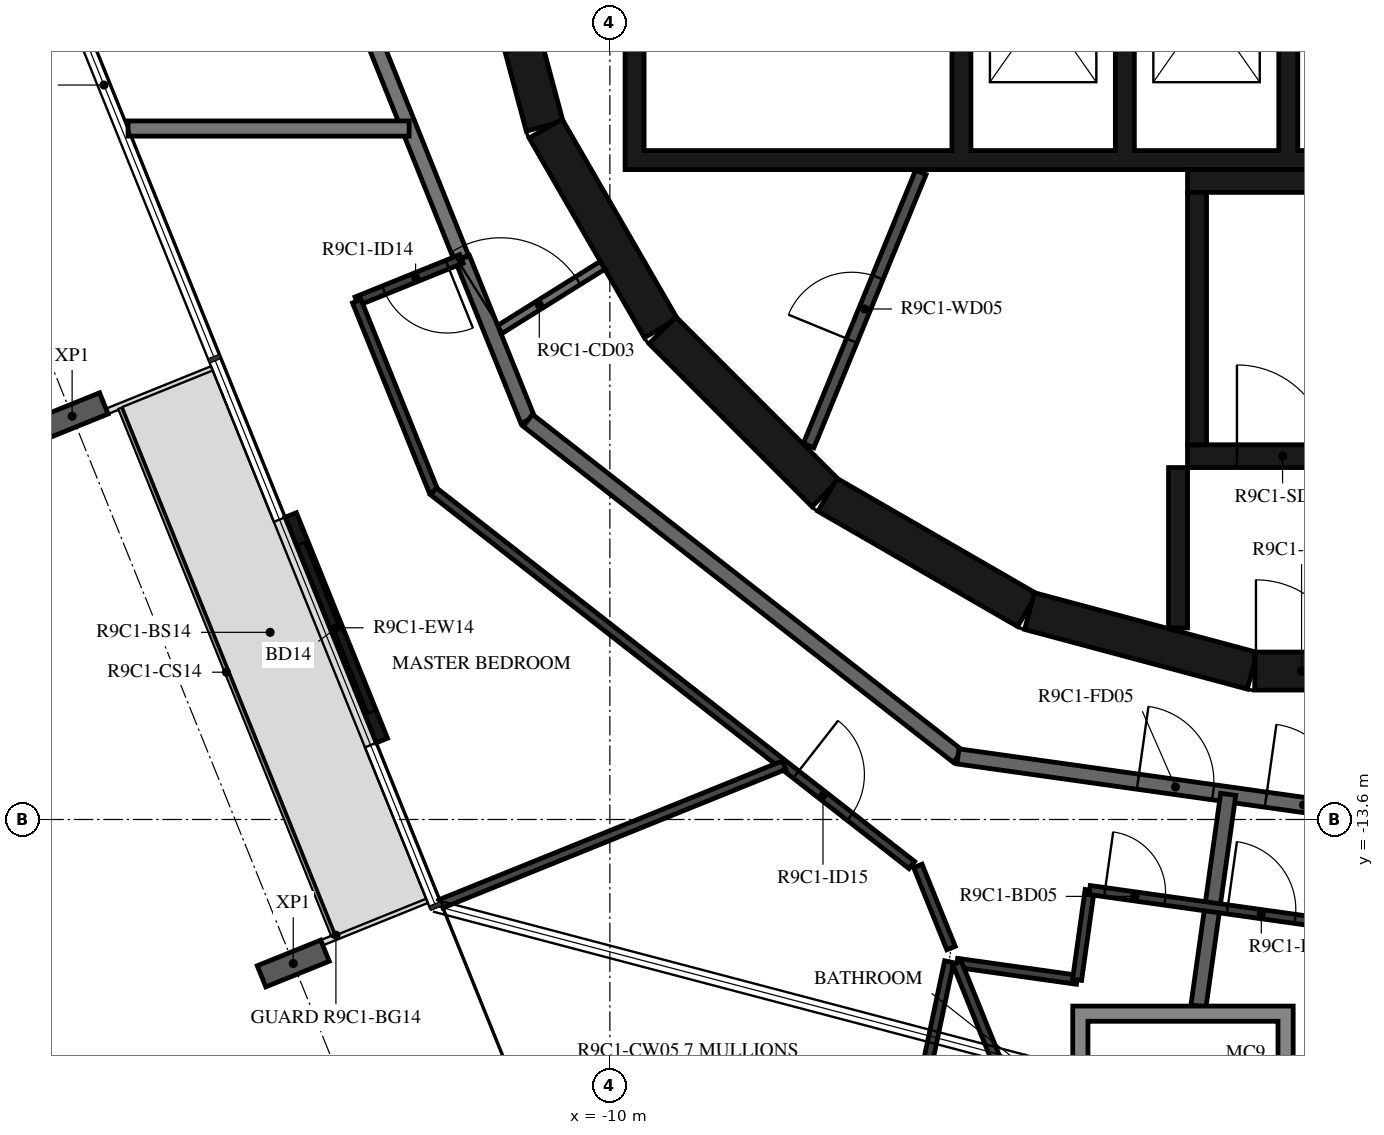
"""IFC4 building model, lengths in metres.
Left out: names, types, materials, properties, quantities, classifications, styles, units other than length and angle.
Written with IfcOpenShell. Run it as: python <this file> out.ifc"""

import sys

from ifc_helpers import new_model, si_unit, direction, frame, frame_2d, origin, origin_2d, place, context, subcontext, project, spatial, polyline, rectangle, i_section, outline, extrude, element, fill, save


model = new_model("IFC4")
c1 = context("Model", 3, precision=1e-05, world=origin(), true_north=direction((0.0, 1.0)))
c2 = subcontext(c1, "Body", "Model", "MODEL_VIEW")
j1 = project(units=[si_unit("LENGTHUNIT", "METRE"), si_unit("PLANEANGLEUNIT", "RADIAN")], contexts=[c1])
p1 = place(None, origin())
s1 = spatial("IfcSite", under=j1, at=p1, CompositionType="ELEMENT")
p2 = place(p1, origin())
s2 = spatial("IfcBuilding", under=s1, at=p2, CompositionType="ELEMENT")
p3 = place(p2, frame((0.0, 0.0, 357.5)))
s3 = spatial("IfcBuildingStorey", under=s2, at=p3, CompositionType="ELEMENT", Elevation=357.5)
for number, where, z_axis, x_axis in (
    (1, (-17.075, -8.294, -0.38), (0.0, 0.0, 1.0), (-0.375, 0.927, 0.0)),
    (2, (-14.166, -15.495, -0.38), (0.0, 0.0, 1.0), (-0.375, 0.927, 0.0)),
):
    element("IfcColumn", number, at=place(p3, frame(where, z_axis=z_axis, x_axis=x_axis)), inside=s3, PredefinedType="COLUMN", context=c2, shape_type="SweptSolid", body=[
        extrude(i_section(OverallWidth=0.3, OverallDepth=0.9, WebThickness=0.019, FlangeThickness=0.035, FilletRadius=0.03, at=origin_2d()), origin(), (0.0, 0.0, 1.0), 3.5),
    ])
p4 = place(p3, frame((-14.198, -9.594, 0.0), z_axis=(0.0, 0.0, 1.0), x_axis=(0.374624519695, -0.927176611678, 0.0)))
e3 = element("IfcWall", 3, at=p4, inside=s3, PredefinedType="STANDARD", context=c2, shape_type="SweptSolid", body=[
    extrude(rectangle(XDim=3.2, YDim=0.16, at=frame_2d((1.6, 0.0))), origin(), (0.0, 0.0, 1.0), 3.12),
])
p5 = place(p4, frame((0.4, 0.0, 0.0)))
e4 = element("IfcOpeningElement", 4, at=p5, cuts=e3, PredefinedType="OPENING", context=c2, shape_type="SweptSolid", body=[
    extrude(rectangle(XDim=2.4, YDim=2.4, at=frame_2d((1.2, 1.2))), frame((0.0, 0.09, 0.0), z_axis=(0.0, -1.0, 0.0), x_axis=(1.0, 0.0, 0.0)), (0.0, 0.0, 1.0), 0.18),
])
p6 = place(p3, frame((-11.643, -1.55, 0.0), z_axis=(0.0, 0.0, 1.0), x_axis=(0.258734743916, -0.965948410781, 0.0)))
e5 = element("IfcWall", 5, at=p6, inside=s3, PredefinedType="SHEAR", context=c2, shape_type="SweptSolid", body=[
    extrude(rectangle(XDim=3.033, YDim=0.5, at=frame_2d((1.516, 0.0))), origin(), (0.0, 0.0, 1.0), 3.12),
])
p7 = place(p6, frame((1.066, 0.0, 0.0)))
e6 = element("IfcOpeningElement", 6, at=p7, cuts=e5, PredefinedType="OPENING", context=c2, shape_type="SweptSolid", body=[
    extrude(rectangle(XDim=0.9, YDim=2.1, at=frame_2d((0.45, 1.05))), frame((0.0, 0.26, 0.0), z_axis=(0.0, -1.0, 0.0), x_axis=(1.0, 0.0, 0.0)), (0.0, 0.0, 1.0), 0.52),
])
p8 = place(p3, frame((-10.845, -4.51, 0.0), z_axis=(0.0, 0.0, 1.0), x_axis=(0.500087131594, -0.865975092491, 0.0)))
e7 = element("IfcWall", 7, at=p8, inside=s3, PredefinedType="SHEAR", context=c2, shape_type="SweptSolid", body=[
    extrude(rectangle(XDim=3.033, YDim=0.5, at=frame_2d((1.516, 0.0))), origin(), (0.0, 0.0, 1.0), 3.12),
])
p9 = place(p3, frame((-9.308, -7.164, 0.0), z_axis=(0.0, 0.0, 1.0), x_axis=(0.707106781187, -0.707106781187, 0.0)))
e8 = element("IfcWall", 8, at=p9, inside=s3, PredefinedType="SHEAR", context=c2, shape_type="SweptSolid", body=[
    extrude(rectangle(XDim=3.032, YDim=0.5, at=frame_2d((1.516, 0.0))), origin(), (0.0, 0.0, 1.0), 3.12),
])
for number, where, z_axis, x_axis in (
    (9, (-7.137, -9.329, 0.0), (0.0, 0.0, 1.0), (0.866, -0.5, 0.0)),
    (10, (-4.479, -10.858, 0.0), (0.0, 0.0, 1.0), (0.966, -0.259, 0.0)),
):
    element("IfcWall", number, at=place(p3, frame(where, z_axis=z_axis, x_axis=x_axis)), inside=s3, PredefinedType="SHEAR", context=c2, shape_type="SweptSolid", body=[
        extrude(rectangle(XDim=3.033, YDim=0.5, at=frame_2d((1.516, 0.0))), origin(), (0.0, 0.0, 1.0), 3.12),
    ])
p10 = place(p3, frame((-1.516, -11.647, 0.0), z_axis=(0.0, 0.0, 1.0), x_axis=(1.0, 0.0, 0.0)))
e11 = element("IfcWall", 11, at=p10, inside=s3, PredefinedType="SHEAR", context=c2, shape_type="SweptSolid", body=[
    extrude(rectangle(XDim=3.033, YDim=0.5, at=frame_2d((1.516, 0.0))), origin(), (0.0, 0.0, 1.0), 3.12),
])
p11 = place(p10, frame((0.016, 0.0, 0.0)))
e12 = element("IfcOpeningElement", 12, at=p11, cuts=e11, PredefinedType="OPENING", context=c2, shape_type="SweptSolid", body=[
    extrude(rectangle(XDim=1.2, YDim=2.1, at=frame_2d((0.6, 1.05))), frame((0.0, 0.26, 0.0), z_axis=(0.0, -1.0, 0.0), x_axis=(1.0, 0.0, 0.0)), (0.0, 0.0, 1.0), 0.52),
])
p12 = place(p3, frame((-2.275, -8.67, 0.0), z_axis=(0.0, 0.0, 1.0), x_axis=(0.0, 1.0, 0.0)))
e13 = element("IfcWall", 13, at=p12, inside=s3, PredefinedType="SHEAR", context=c2, shape_type="SweptSolid", body=[
    extrude(rectangle(XDim=3.32, YDim=0.25, at=frame_2d((1.66, 0.0))), origin(), (0.0, 0.0, 1.0), 3.12),
])
p13 = place(p3, frame((-2.4, -5.2, 0.0), z_axis=(0.0, 0.0, 1.0), x_axis=(1.0, 0.0, 0.0)))
e14 = element("IfcWall", 14, at=p13, inside=s3, PredefinedType="SHEAR", context=c2, shape_type="SweptSolid", body=[
    extrude(rectangle(XDim=7.05, YDim=0.3, at=frame_2d((3.525, 0.0))), origin(), (0.0, 0.0, 1.0), 3.12),
])
p14 = place(p3, frame((-2.4, -8.82, 0.0), z_axis=(0.0, 0.0, 1.0), x_axis=(1.0, 0.0, 0.0)))
e15 = element("IfcWall", 15, at=p14, inside=s3, PredefinedType="SHEAR", context=c2, shape_type="SweptSolid", body=[
    extrude(rectangle(XDim=2.5, YDim=0.3, at=frame_2d((1.25, 0.0))), origin(), (0.0, 0.0, 1.0), 3.12),
])
p15 = place(p14, frame((0.65, 0.0, 0.0)))
e16 = element("IfcOpeningElement", 16, at=p15, cuts=e15, PredefinedType="OPENING", context=c2, shape_type="SweptSolid", body=[
    extrude(rectangle(XDim=1.2, YDim=2.1, at=frame_2d((0.6, 1.05))), frame((0.0, 0.16, 0.0), z_axis=(0.0, -1.0, 0.0), x_axis=(1.0, 0.0, 0.0)), (0.0, 0.0, 1.0), 0.32),
])
p16 = place(p3, frame((-2.525, -8.97, 0.0), z_axis=(0.0, 0.0, 1.0), x_axis=(0.0, -1.0, 0.0)))
e17 = element("IfcWall", 17, at=p16, inside=s3, PredefinedType="SHEAR", context=c2, shape_type="SweptSolid", body=[
    extrude(rectangle(XDim=2.11, YDim=0.25, at=frame_2d((1.055, 0.0))), origin(), (0.0, 0.0, 1.0), 3.12),
])
p17 = place(p3, origin())
e18 = element("IfcWall", 18, at=p17, inside=s3, PredefinedType="SHEAR", context=c2, shape_type="SweptSolid", body=[
    extrude(outline(polyline([(9.8, -5.05), (9.8, -4.8), (9.8, -1.9), (9.55, -1.9), (9.55, -4.8), (7.65, -4.8), (7.65, -1.9), (7.4, -1.9), (7.4, -4.8), (5.5, -4.8), (5.5, -1.9), (5.25, -1.9), (5.25, -4.8), (3.35, -4.8), (3.35, -1.9), (3.1, -1.9), (3.1, -4.8), (1.2, -4.8), (1.2, -1.9), (0.95, -1.9), (0.95, -4.8), (-0.95, -4.8), (-0.95, -1.9), (-1.2, -1.9), (-1.2, -4.8), (-3.1, -4.8), (-3.1, -1.9), (-3.35, -1.9), (-3.35, -4.8), (-5.25, -4.8), (-5.25, -1.9), (-5.5, -1.9), (-5.5, -4.8), (-9.55, -4.8), (-9.55, -1.9), (-9.8, -1.9), (-9.8, -4.8), (-9.8, -5.05), (9.8, -5.05)])), origin(), (0.0, 0.0, 1.0), 3.12),
])
p18 = place(p3, frame((-7.385, -8.681, 0.0), z_axis=(0.0, 0.0, 1.0), x_axis=(0.379804590409, 0.925066739811, 0.0)))
e19 = element("IfcWall", 19, at=p18, inside=s3, PredefinedType="PARTITIONING", context=c2, shape_type="SweptSolid", body=[
    extrude(rectangle(XDim=3.885, YDim=0.15, at=frame_2d((1.942, 0.0))), origin(), (0.0, 0.0, 1.0), 3.12),
])
p19 = place(p18, frame((1.493, 0.0, 0.0)))
e20 = element("IfcOpeningElement", 20, at=p19, cuts=e19, PredefinedType="OPENING", context=c2, shape_type="SweptSolid", body=[
    extrude(rectangle(XDim=0.9, YDim=2.1, at=frame_2d((0.45, 1.05))), frame((0.0, 0.085, 0.0), z_axis=(0.0, -1.0, 0.0), x_axis=(1.0, 0.0, 0.0)), (0.0, 0.0, 1.0), 0.17),
])
p20 = place(p3, frame((-11.539, -7.21, 0.0), z_axis=(0.0, 0.0, 1.0), x_axis=(0.848103039868, 0.529831325769, 0.0)))
e21 = element("IfcWall", 21, at=p20, inside=s3, PredefinedType="PARTITIONING", context=c2, shape_type="SweptSolid", body=[
    extrude(rectangle(XDim=1.702, YDim=0.12, at=frame_2d((0.851, 0.0))), origin(), (0.0, 0.0, 1.0), 3.12),
])
p21 = place(p20, frame((0.12, 0.0, 0.0)))
e22 = element("IfcOpeningElement", 22, at=p21, cuts=e21, PredefinedType="OPENING", context=c2, shape_type="SweptSolid", body=[
    extrude(rectangle(XDim=1.2, YDim=2.1, at=frame_2d((0.6, 1.05))), frame((0.0, 0.07, 0.0), z_axis=(0.0, -1.0, 0.0), x_axis=(1.0, 0.0, 0.0)), (0.0, 0.0, 1.0), 0.14),
])
p22 = place(p3, frame((-13.769, -1.691, 0.0), z_axis=(0.0, 0.0, 1.0), x_axis=(0.372720094028, -0.927943819155, 0.0)))
e23 = element("IfcWall", 23, at=p22, inside=s3, PredefinedType="STANDARD", context=c2, shape_type="SweptSolid", body=[
    extrude(rectangle(XDim=4.875, YDim=0.2, at=frame_2d((2.438, 0.0))), origin(), (0.0, 0.0, 1.0), 3.12),
])
p23 = place(p3, frame((-11.939, -6.22, 0.0), z_axis=(0.0, 0.0, 1.0), x_axis=(0.374651128394, -0.927165860024, 0.0)))
e24 = element("IfcWall", 24, at=p23, inside=s3, PredefinedType="STANDARD", context=c2, shape_type="SweptSolid", body=[
    extrude(rectangle(XDim=2.296, YDim=0.2, at=frame_2d((1.148, 0.0))), origin(), (0.0, 0.0, 1.0), 3.12),
])
p24 = place(p3, frame((-11.079, -8.349, 0.0), z_axis=(0.0, 0.0, 1.0), x_axis=(0.78800478687, -0.615669112324, 0.0)))
e25 = element("IfcWall", 25, at=p24, inside=s3, PredefinedType="STANDARD", context=c2, shape_type="SweptSolid", body=[
    extrude(rectangle(XDim=7.181, YDim=0.2, at=frame_2d((3.591, 0.0))), origin(), (0.0, 0.0, 1.0), 3.12),
])
p25 = place(p3, frame((-5.42, -12.77, 0.0), z_axis=(0.0, 0.0, 1.0), x_axis=(0.990270565508, -0.139155334385, 0.0)))
e26 = element("IfcWall", 26, at=p25, inside=s3, PredefinedType="STANDARD", context=c2, shape_type="SweptSolid", body=[
    extrude(rectangle(XDim=7.181, YDim=0.2, at=frame_2d((3.59, 0.0))), origin(), (0.0, 0.0, 1.0), 3.12),
])
p26 = place(p25, frame((2.39, 0.0, 0.0)))
e27 = element("IfcOpeningElement", 27, at=p26, cuts=e26, PredefinedType="OPENING", context=c2, shape_type="SweptSolid", body=[
    extrude(rectangle(XDim=1.0, YDim=2.1, at=frame_2d((0.5, 1.05))), frame((0.0, 0.11, 0.0), z_axis=(0.0, -1.0, 0.0), x_axis=(1.0, 0.0, 0.0)), (0.0, 0.0, 1.0), 0.22),
])
p27 = place(p25, frame((4.091, 0.0, 0.0)))
e28 = element("IfcOpeningElement", 28, at=p27, cuts=e26, PredefinedType="OPENING", context=c2, shape_type="SweptSolid", body=[
    extrude(rectangle(XDim=1.0, YDim=2.1, at=frame_2d((0.5, 1.05))), frame((0.0, 0.11, 0.0), z_axis=(0.0, -1.0, 0.0), x_axis=(1.0, 0.0, 0.0)), (0.0, 0.0, 1.0), 0.22),
])
p28 = place(p3, frame((-16.339, -4.51, 0.0), z_axis=(0.0, 0.0, 1.0), x_axis=(1.0, 0.0, 0.0)))
e29 = element("IfcWall", 29, at=p28, inside=s3, PredefinedType="STANDARD", context=c2, shape_type="SweptSolid", body=[
    extrude(rectangle(XDim=3.698, YDim=0.2, at=frame_2d((1.849, 0.0))), origin(), (0.0, 0.0, 1.0), 3.12),
])
p29 = place(p3, frame((-2.256, -16.055, 0.0), z_axis=(0.0, 0.0, 1.0), x_axis=(0.139148428478, 0.990271535919, 0.0)))
e30 = element("IfcWall", 30, at=p29, inside=s3, PredefinedType="STANDARD", context=c2, shape_type="SweptSolid", body=[
    extrude(rectangle(XDim=2.812, YDim=0.2, at=frame_2d((1.406, 0.0))), origin(), (0.0, 0.0, 1.0), 3.12),
])
p30 = place(p3, frame((-11.953, -6.225, 0.0), z_axis=(0.0, 0.0, 1.0), x_axis=(-0.927144096717, -0.374704982518, 0.0)))
e31 = element("IfcWall", 31, at=p30, inside=s3, PredefinedType="PARTITIONING", context=c2, shape_type="SweptSolid", body=[
    extrude(rectangle(XDim=1.485, YDim=0.12, at=frame_2d((0.742, 0.0))), origin(), (0.0, 0.0, 1.0), 3.12),
])
p31 = place(p30, frame((0.2, 0.0, 0.0)))
e32 = element("IfcOpeningElement", 32, at=p31, cuts=e31, PredefinedType="OPENING", context=c2, shape_type="SweptSolid", body=[
    extrude(rectangle(XDim=0.9, YDim=2.1, at=frame_2d((0.45, 1.05))), frame((0.0, 0.07, 0.0), z_axis=(0.0, -1.0, 0.0), x_axis=(1.0, 0.0, 0.0)), (0.0, 0.0, 1.0), 0.14),
])
p32 = place(p3, frame((-13.33, -6.782, 0.0), z_axis=(0.0, 0.0, 1.0), x_axis=(0.374602180132, -0.927185637637, 0.0)))
e33 = element("IfcWall", 33, at=p32, inside=s3, PredefinedType="PARTITIONING", context=c2, shape_type="SweptSolid", body=[
    extrude(rectangle(XDim=2.698, YDim=0.12, at=frame_2d((1.349, 0.0))), origin(), (0.0, 0.0, 1.0), 3.12),
])
p33 = place(p3, frame((-12.319, -9.283, 0.0), z_axis=(0.0, 0.0, 1.0), x_axis=(0.788000268464, -0.61567489546, 0.0)))
e34 = element("IfcWall", 34, at=p33, inside=s3, PredefinedType="PARTITIONING", context=c2, shape_type="SweptSolid", body=[
    extrude(rectangle(XDim=7.985, YDim=0.12, at=frame_2d((3.992, 0.0))), origin(), (0.0, 0.0, 1.0), 3.12),
])
p34 = place(p33, frame((6.051, 0.0, 0.0)))
e35 = element("IfcOpeningElement", 35, at=p34, cuts=e34, PredefinedType="OPENING", context=c2, shape_type="SweptSolid", body=[
    extrude(rectangle(XDim=0.9, YDim=2.1, at=frame_2d((0.45, 1.05))), frame((0.0, 0.07, 0.0), z_axis=(0.0, -1.0, 0.0), x_axis=(1.0, 0.0, 0.0)), (0.0, 0.0, 1.0), 0.14),
])
p35 = place(p3, frame((-5.948, -14.21, 0.0), z_axis=(0.0, 0.0, 1.0), x_axis=(0.374601530156, -0.927185900241, 0.0)))
e36 = element("IfcWall", 36, at=p35, inside=s3, PredefinedType="PARTITIONING", context=c2, shape_type="SweptSolid", body=[
    extrude(rectangle(XDim=1.166, YDim=0.12, at=frame_2d((0.583, 0.0))), origin(), (0.0, 0.0, 1.0), 3.12),
])
p36 = place(p3, frame((-5.433, -15.487, 0.0), z_axis=(0.0, 0.0, 1.0), x_axis=(0.990268451053, -0.139170380644, 0.0)))
e37 = element("IfcWall", 37, at=p36, inside=s3, PredefinedType="PARTITIONING", context=c2, shape_type="SweptSolid", body=[
    extrude(rectangle(XDim=1.595, YDim=0.12, at=frame_2d((0.797, 0.0))), origin(), (0.0, 0.0, 1.0), 3.12),
])
p37 = place(p3, frame((-3.854, -15.708, 0.0), z_axis=(0.0, 0.0, 1.0), x_axis=(0.139298773474, 0.99025039849, 0.0)))
e38 = element("IfcWall", 38, at=p37, inside=s3, PredefinedType="PARTITIONING", context=c2, shape_type="SweptSolid", body=[
    extrude(rectangle(XDim=1.192, YDim=0.12, at=frame_2d((0.596, 0.0))), origin(), (0.0, 0.0, 1.0), 3.12),
])
p38 = place(p3, frame((-3.688, -14.528, 0.0), z_axis=(0.0, 0.0, 1.0), x_axis=(0.990273413633, -0.139135064782, 0.0)))
e39 = element("IfcWall", 39, at=p38, inside=s3, PredefinedType="PARTITIONING", context=c2, shape_type="SweptSolid", body=[
    extrude(rectangle(XDim=5.622, YDim=0.12, at=frame_2d((2.811, 0.0))), origin(), (0.0, 0.0, 1.0), 3.12),
])
p39 = place(p38, frame((0.2, 0.0, 0.0)))
e40 = element("IfcOpeningElement", 40, at=p39, cuts=e39, PredefinedType="OPENING", context=c2, shape_type="SweptSolid", body=[
    extrude(rectangle(XDim=0.8, YDim=2.1, at=frame_2d((0.4, 1.05))), frame((0.0, 0.07, 0.0), z_axis=(0.0, -1.0, 0.0), x_axis=(1.0, 0.0, 0.0)), (0.0, 0.0, 1.0), 0.14),
])
p40 = place(p38, frame((1.83, 0.0, 0.0)))
e41 = element("IfcOpeningElement", 41, at=p40, cuts=e39, PredefinedType="OPENING", context=c2, shape_type="SweptSolid", body=[
    extrude(rectangle(XDim=0.9, YDim=2.1, at=frame_2d((0.45, 1.05))), frame((0.0, 0.07, 0.0), z_axis=(0.0, -1.0, 0.0), x_axis=(1.0, 0.0, 0.0)), (0.0, 0.0, 1.0), 0.14),
])
p41 = place(p3, frame((-12.219, -14.708, 0.0), z_axis=(0.0, 0.0, 1.0), x_axis=(0.927176471086, 0.374624867655, 0.0)))
e42 = element("IfcWall", 42, at=p41, inside=s3, PredefinedType="PARTITIONING", context=c2, shape_type="SweptSolid", body=[
    extrude(rectangle(XDim=4.864, YDim=0.12, at=frame_2d((2.432, 0.0))), origin(), (0.0, 0.0, 1.0), 2.73),
])
p42 = place(p3, frame((-7.305, -23.815, 0.0), z_axis=(0.0, 0.0, 1.0), x_axis=(0.207366409306, 0.978263345062, 0.0)))
e43 = element("IfcWall", 43, at=p42, inside=s3, PredefinedType="PARTITIONING", context=c2, shape_type="SweptSolid", body=[
    extrude(rectangle(XDim=8.529, YDim=0.12, at=frame_2d((4.264, 0.0))), origin(), (0.0, 0.0, 1.0), 3.12),
])
p43 = place(p42, frame((0.4, 0.0, 0.0)))
e44 = element("IfcOpeningElement", 44, at=p43, cuts=e43, PredefinedType="OPENING", context=c2, shape_type="SweptSolid", body=[
    extrude(rectangle(XDim=0.9, YDim=2.1, at=frame_2d((0.45, 1.05))), frame((0.0, 0.07, 0.0), z_axis=(0.0, -1.0, 0.0), x_axis=(1.0, 0.0, 0.0)), (0.0, 0.0, 1.0), 0.14),
])
p44 = place(p3, frame((-4.445, -17.93, 0.0), z_axis=(0.0, 0.0, 1.0), x_axis=(-0.374614676827, 0.927180588616, 0.0)))
e45 = element("IfcWall", 45, at=p44, inside=s3, PredefinedType="PARTITIONING", context=c2, shape_type="SweptSolid", body=[
    extrude(rectangle(XDim=2.635, YDim=0.12, at=frame_2d((1.318, 0.0))), origin(), (0.0, 0.0, 1.0), 3.12),
])
p45 = place(p3, origin())
e46 = element("IfcWall", 46, at=p45, inside=s3, PredefinedType="STANDARD", context=c2, shape_type="SweptSolid", body=[
    extrude(outline(polyline([(-1.01, -16.055), (-1.01, -18.955), (-3.91, -18.955), (-3.91, -16.055), (-1.01, -16.055)]), holes=[polyline([(-3.71, -18.755), (-1.21, -18.755), (-1.21, -16.255), (-3.71, -16.255), (-3.71, -18.755)])]), origin(), (0.0, 0.0, 1.0), 3.12),
])
p46 = place(p5, origin())
e47 = element("IfcDoor", 47, at=p46, inside=s3, OperationType="DOUBLE_DOOR_SLIDING", PredefinedType="DOOR", context=c2, shape_type="SweptSolid", body=[
    extrude(rectangle(XDim=2.4, YDim=2.4, at=frame_2d((1.2, 1.2))), frame((0.0, 0.025, 0.0), z_axis=(0.0, -1.0, 0.0), x_axis=(1.0, 0.0, 0.0)), (0.0, 0.0, 1.0), 0.05),
])
fill(e4, e47)
p47 = place(p15, origin())
e48 = element("IfcDoor", 48, at=p47, inside=s3, OperationType="SINGLE_SWING_LEFT", PredefinedType="DOOR", context=c2, shape_type="SweptSolid", body=[
    extrude(rectangle(XDim=1.2, YDim=2.1, at=frame_2d((0.6, 1.05))), frame((0.0, 0.025, 0.0), z_axis=(0.0, -1.0, 0.0), x_axis=(1.0, 0.0, 0.0)), (0.0, 0.0, 1.0), 0.05),
])
fill(e16, e48)
p48 = place(p11, origin())
e49 = element("IfcDoor", 49, at=p48, inside=s3, OperationType="SINGLE_SWING_RIGHT", PredefinedType="DOOR", context=c2, shape_type="SweptSolid", body=[
    extrude(rectangle(XDim=1.2, YDim=2.1, at=frame_2d((0.6, 1.05))), frame((0.0, 0.025, 0.0), z_axis=(0.0, -1.0, 0.0), x_axis=(1.0, 0.0, 0.0)), (0.0, 0.0, 1.0), 0.05),
])
fill(e12, e49)
p49 = place(p19, origin())
e50 = element("IfcDoor", 50, at=p49, inside=s3, OperationType="SINGLE_SWING_LEFT", PredefinedType="DOOR", context=c2, shape_type="SweptSolid", body=[
    extrude(rectangle(XDim=0.9, YDim=2.1, at=frame_2d((0.45, 1.05))), frame((0.0, 0.025, 0.0), z_axis=(0.0, -1.0, 0.0), x_axis=(1.0, 0.0, 0.0)), (0.0, 0.0, 1.0), 0.05),
])
fill(e20, e50)
p50 = place(p26, origin())
e51 = element("IfcDoor", 51, at=p50, inside=s3, OperationType="SINGLE_SWING_RIGHT", PredefinedType="DOOR", context=c2, shape_type="SweptSolid", body=[
    extrude(rectangle(XDim=1.0, YDim=2.1, at=frame_2d((0.5, 1.05))), frame((0.0, 0.025, 0.0), z_axis=(0.0, -1.0, 0.0), x_axis=(1.0, 0.0, 0.0)), (0.0, 0.0, 1.0), 0.05),
])
fill(e27, e51)
p51 = place(p31, origin())
e52 = element("IfcDoor", 52, at=p51, inside=s3, OperationType="SINGLE_SWING_LEFT", PredefinedType="DOOR", context=c2, shape_type="SweptSolid", body=[
    extrude(rectangle(XDim=0.9, YDim=2.1, at=frame_2d((0.45, 1.05))), frame((0.0, 0.025, 0.0), z_axis=(0.0, -1.0, 0.0), x_axis=(1.0, 0.0, 0.0)), (0.0, 0.0, 1.0), 0.05),
])
fill(e32, e52)
p52 = place(p34, origin())
e53 = element("IfcDoor", 53, at=p52, inside=s3, OperationType="SINGLE_SWING_RIGHT", PredefinedType="DOOR", context=c2, shape_type="SweptSolid", body=[
    extrude(rectangle(XDim=0.9, YDim=2.1, at=frame_2d((0.45, 1.05))), frame((0.0, 0.025, 0.0), z_axis=(0.0, -1.0, 0.0), x_axis=(1.0, 0.0, 0.0)), (0.0, 0.0, 1.0), 0.05),
])
fill(e35, e53)
p53 = place(p39, origin())
e54 = element("IfcDoor", 54, at=p53, inside=s3, OperationType="SINGLE_SWING_RIGHT", PredefinedType="DOOR", context=c2, shape_type="SweptSolid", body=[
    extrude(rectangle(XDim=0.8, YDim=2.1, at=frame_2d((0.4, 1.05))), frame((0.0, 0.025, 0.0), z_axis=(0.0, -1.0, 0.0), x_axis=(1.0, 0.0, 0.0)), (0.0, 0.0, 1.0), 0.05),
])
fill(e40, e54)
p54 = place(p27, origin())
e55 = element("IfcDoor", 55, at=p54, inside=s3, OperationType="SINGLE_SWING_RIGHT", PredefinedType="DOOR", context=c2, shape_type="SweptSolid", body=[
    extrude(rectangle(XDim=1.0, YDim=2.1, at=frame_2d((0.5, 1.05))), frame((0.0, 0.025, 0.0), z_axis=(0.0, -1.0, 0.0), x_axis=(1.0, 0.0, 0.0)), (0.0, 0.0, 1.0), 0.05),
])
fill(e28, e55)
p55 = place(p40, origin())
e56 = element("IfcDoor", 56, at=p55, inside=s3, OperationType="SINGLE_SWING_RIGHT", PredefinedType="DOOR", context=c2, shape_type="SweptSolid", body=[
    extrude(rectangle(XDim=0.9, YDim=2.1, at=frame_2d((0.45, 1.05))), frame((0.0, 0.025, 0.0), z_axis=(0.0, -1.0, 0.0), x_axis=(1.0, 0.0, 0.0)), (0.0, 0.0, 1.0), 0.05),
])
fill(e41, e56)
p56 = place(p21, origin())
e57 = element("IfcDoor", 57, at=p56, inside=s3, OperationType="DOUBLE_DOOR_SINGLE_SWING", PredefinedType="DOOR", context=c2, shape_type="SweptSolid", body=[
    extrude(rectangle(XDim=1.2, YDim=2.1, at=frame_2d((0.6, 1.05))), frame((0.0, 0.025, 0.0), z_axis=(0.0, -1.0, 0.0), x_axis=(1.0, 0.0, 0.0)), (0.0, 0.0, 1.0), 0.05),
])
fill(e22, e57)
save(model, sys.argv[1])
